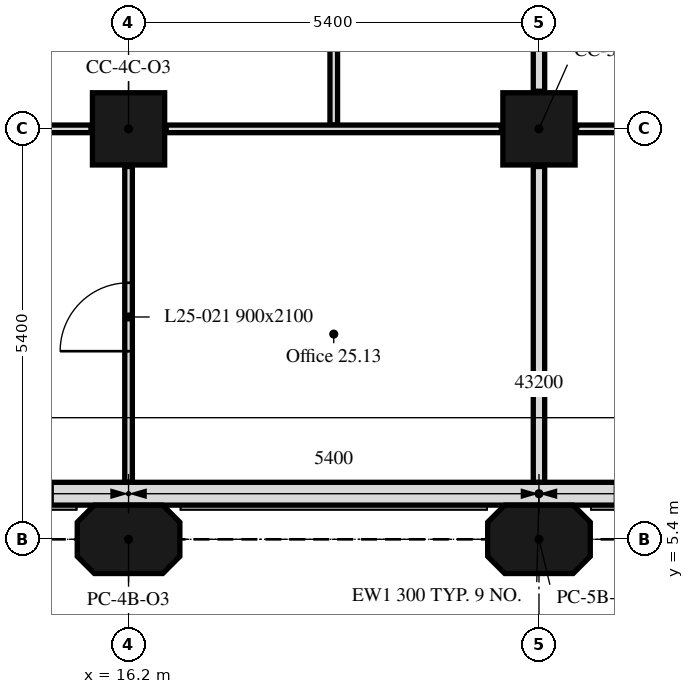
"""IFC4 building model, lengths in metres.
Left out: names, types, materials, properties, quantities, classifications, styles, units other than length and angle.
Written with IfcOpenShell. Run it as: python <this file> out.ifc"""

import sys

from ifc_helpers import new_model, si_unit, direction, frame, frame_2d, origin, origin_2d, place, context, subcontext, project, spatial, polyline, rectangle, outline, extrude, element, fill, save


model = new_model("IFC4")
c1 = context("Model", 3, precision=1e-05, world=origin(), true_north=direction((0.0, 1.0)))
c2 = subcontext(c1, "Body", "Model", "MODEL_VIEW")
j1 = project(units=[si_unit("LENGTHUNIT", "METRE"), si_unit("PLANEANGLEUNIT", "RADIAN")], contexts=[c1])
p1 = place(None, origin())
s1 = spatial("IfcSite", under=j1, at=p1, CompositionType="ELEMENT")
p2 = place(p1, origin())
s2 = spatial("IfcBuilding", under=s1, at=p2, CompositionType="ELEMENT")
p3 = place(p2, frame((0.0, 0.0, 106.8)))
s3 = spatial("IfcBuildingStorey", under=s2, at=p3, CompositionType="ELEMENT", Elevation=106.8)
for number, where, z_axis, x_axis in (
    (1, (16.2, 5.4, 0.0), (0.0, 0.0, 1.0), (1.0, 0.0, 0.0)),
    (2, (21.6, 5.4, 0.0), (0.0, 0.0, 1.0), (1.0, 0.0, 0.0)),
):
    element("IfcColumn", number, at=place(p3, frame(where, z_axis=z_axis, x_axis=x_axis)), inside=s3, PredefinedType="COLUMN", context=c2, shape_type="SweptSolid", body=[
        extrude(outline(polyline([(-0.45, -0.45), (0.45, -0.45), (0.675, -0.225), (0.675, 0.225), (0.45, 0.45), (-0.45, 0.45), (-0.675, 0.225), (-0.675, -0.225), (-0.45, -0.45)])), origin(), (0.0, 0.0, 1.0), 3.5),
    ])
for number, where, z_axis, x_axis in (
    (3, (16.2, 10.8, 0.0), (0.0, 0.0, 1.0), (1.0, 0.0, 0.0)),
    (4, (21.6, 10.8, 0.0), (0.0, 0.0, 1.0), (1.0, 0.0, 0.0)),
):
    element("IfcColumn", number, at=place(p3, frame(where, z_axis=z_axis, x_axis=x_axis)), inside=s3, PredefinedType="COLUMN", context=c2, shape_type="SweptSolid", body=[
        extrude(rectangle(XDim=0.95, YDim=0.95, at=origin_2d()), origin(), (0.0, 0.0, 1.0), 3.5),
    ])
p4 = place(p3, frame((5.586, 6.0, 0.0), z_axis=(0.0, 0.0, 1.0), x_axis=(1.0, 0.0, 0.0)))
e5 = element("IfcWall", 5, at=p4, inside=s3, PredefinedType="SOLIDWALL", context=c2, shape_type="SweptSolid", body=[
    extrude(rectangle(XDim=32.027, YDim=0.3, at=frame_2d((16.014, 0.0))), origin(), (0.0, 0.0, 1.0), 3.5),
])
p5 = place(p4, frame((6.214, 0.0, 0.9)))
e6 = element("IfcOpeningElement", 6, at=p5, cuts=e5, PredefinedType="OPENING", context=c2, shape_type="SweptSolid", body=[
    extrude(rectangle(XDim=3.4, YDim=1.7, at=frame_2d((1.7, 0.85))), frame((0.0, 0.16, 0.0), z_axis=(0.0, -1.0, 0.0), x_axis=(1.0, 0.0, 0.0)), (0.0, 0.0, 1.0), 0.32),
])
p6 = place(p4, frame((17.014, 0.0, 0.9)))
e7 = element("IfcOpeningElement", 7, at=p6, cuts=e5, PredefinedType="OPENING", context=c2, shape_type="SweptSolid", body=[
    extrude(rectangle(XDim=3.4, YDim=1.7, at=frame_2d((1.7, 0.85))), frame((0.0, 0.16, 0.0), z_axis=(0.0, -1.0, 0.0), x_axis=(1.0, 0.0, 0.0)), (0.0, 0.0, 1.0), 0.32),
])
p7 = place(p4, frame((27.814, 0.0, 0.9)))
e8 = element("IfcOpeningElement", 8, at=p7, cuts=e5, PredefinedType="OPENING", context=c2, shape_type="SweptSolid", body=[
    extrude(rectangle(XDim=3.4, YDim=1.7, at=frame_2d((1.7, 0.85))), frame((0.0, 0.16, 0.0), z_axis=(0.0, -1.0, 0.0), x_axis=(1.0, 0.0, 0.0)), (0.0, 0.0, 1.0), 0.32),
])
p8 = place(p3, frame((11.295, 10.8, 0.0), z_axis=(0.0, 0.0, 1.0), x_axis=(1.0, 0.0, 0.0)))
e9 = element("IfcWall", 9, at=p8, inside=s3, PredefinedType="PARTITIONING", context=c2, shape_type="SweptSolid", body=[
    extrude(rectangle(XDim=4.41, YDim=0.1, at=frame_2d((2.205, 0.0))), origin(), (0.0, 0.0, 1.0), 3.5),
])
p9 = place(p8, frame((2.375, 0.0, 0.0)))
e10 = element("IfcOpeningElement", 10, at=p9, cuts=e9, PredefinedType="OPENING", context=c2, shape_type="SweptSolid", body=[
    extrude(rectangle(XDim=0.9, YDim=2.1, at=frame_2d((0.45, 1.05))), frame((0.0, 0.05, 0.0), z_axis=(0.0, -1.0, 0.0), x_axis=(1.0, 0.0, 0.0)), (0.0, 0.0, 1.0), 0.1),
])
p10 = place(p3, frame((18.9, 10.85, 0.0), z_axis=(0.0, 0.0, 1.0), x_axis=(0.0, 1.0, 0.0)))
e11 = element("IfcWall", 11, at=p10, inside=s3, PredefinedType="PARTITIONING", context=c2, shape_type="SweptSolid", body=[
    extrude(rectangle(XDim=2.575, YDim=0.1, at=frame_2d((1.288, 0.0))), origin(), (0.0, 0.0, 1.0), 3.5),
])
p11 = place(p10, frame((1.425, 0.0, 0.0)))
e12 = element("IfcOpeningElement", 12, at=p11, cuts=e11, PredefinedType="OPENING", context=c2, shape_type="SweptSolid", body=[
    extrude(rectangle(XDim=0.9, YDim=2.1, at=frame_2d((0.45, 1.05))), frame((0.0, 0.05, 0.0), z_axis=(0.0, -1.0, 0.0), x_axis=(1.0, 0.0, 0.0)), (0.0, 0.0, 1.0), 0.1),
])
p12 = place(p3, frame((16.695, 10.8, 0.0), z_axis=(0.0, 0.0, 1.0), x_axis=(1.0, 0.0, 0.0)))
e13 = element("IfcWall", 13, at=p12, inside=s3, PredefinedType="PARTITIONING", context=c2, shape_type="SweptSolid", body=[
    extrude(rectangle(XDim=4.41, YDim=0.1, at=frame_2d((2.205, 0.0))), origin(), (0.0, 0.0, 1.0), 3.5),
])
p13 = place(p3, frame((21.6, 11.295, 0.0), z_axis=(0.0, 0.0, 1.0), x_axis=(0.0, 1.0, 0.0)))
e14 = element("IfcWall", 14, at=p13, inside=s3, PredefinedType="PARTITIONING", context=c2, shape_type="SweptSolid", body=[
    extrude(rectangle(XDim=2.13, YDim=0.15, at=frame_2d((1.065, 0.0))), origin(), (0.0, 0.0, 1.0), 3.5),
])
p14 = place(p3, frame((16.2, 6.151, 0.0), z_axis=(0.0, 0.0, 1.0), x_axis=(0.0, 1.0, 0.0)))
e15 = element("IfcWall", 15, at=p14, inside=s3, PredefinedType="PARTITIONING", context=c2, shape_type="SweptSolid", body=[
    extrude(rectangle(XDim=4.154, YDim=0.1, at=frame_2d((2.077, 0.0))), origin(), (0.0, 0.0, 1.0), 3.5),
])
p15 = place(p14, frame((1.724, 0.0, 0.0)))
e16 = element("IfcOpeningElement", 16, at=p15, cuts=e15, PredefinedType="OPENING", context=c2, shape_type="SweptSolid", body=[
    extrude(rectangle(XDim=0.9, YDim=2.1, at=frame_2d((0.45, 1.05))), frame((0.0, 0.05, 0.0), z_axis=(0.0, -1.0, 0.0), x_axis=(1.0, 0.0, 0.0)), (0.0, 0.0, 1.0), 0.1),
])
p16 = place(p3, frame((21.6, 6.151, 0.0), z_axis=(0.0, 0.0, 1.0), x_axis=(0.0, 1.0, 0.0)))
e17 = element("IfcWall", 17, at=p16, inside=s3, PredefinedType="PARTITIONING", context=c2, shape_type="SweptSolid", body=[
    extrude(rectangle(XDim=4.154, YDim=0.15, at=frame_2d((2.077, 0.0))), origin(), (0.0, 0.0, 1.0), 3.5),
])
p17 = place(p3, frame((22.095, 10.8, 0.0), z_axis=(0.0, 0.0, 1.0), x_axis=(1.0, 0.0, 0.0)))
e18 = element("IfcWall", 18, at=p17, inside=s3, PredefinedType="PARTITIONING", context=c2, shape_type="SweptSolid", body=[
    extrude(rectangle(XDim=4.41, YDim=0.1, at=frame_2d((2.205, 0.0))), origin(), (0.0, 0.0, 1.0), 3.5),
])
p18 = place(p15, origin())
e19 = element("IfcDoor", 19, at=p18, inside=s3, OperationType="SINGLE_SWING_RIGHT", PredefinedType="DOOR", context=c2, shape_type="SweptSolid", body=[
    extrude(rectangle(XDim=0.9, YDim=2.1, at=frame_2d((0.45, 1.05))), frame((0.0, 0.025, 0.0), z_axis=(0.0, -1.0, 0.0), x_axis=(1.0, 0.0, 0.0)), (0.0, 0.0, 1.0), 0.05),
])
fill(e16, e19)
save(model, sys.argv[1])
